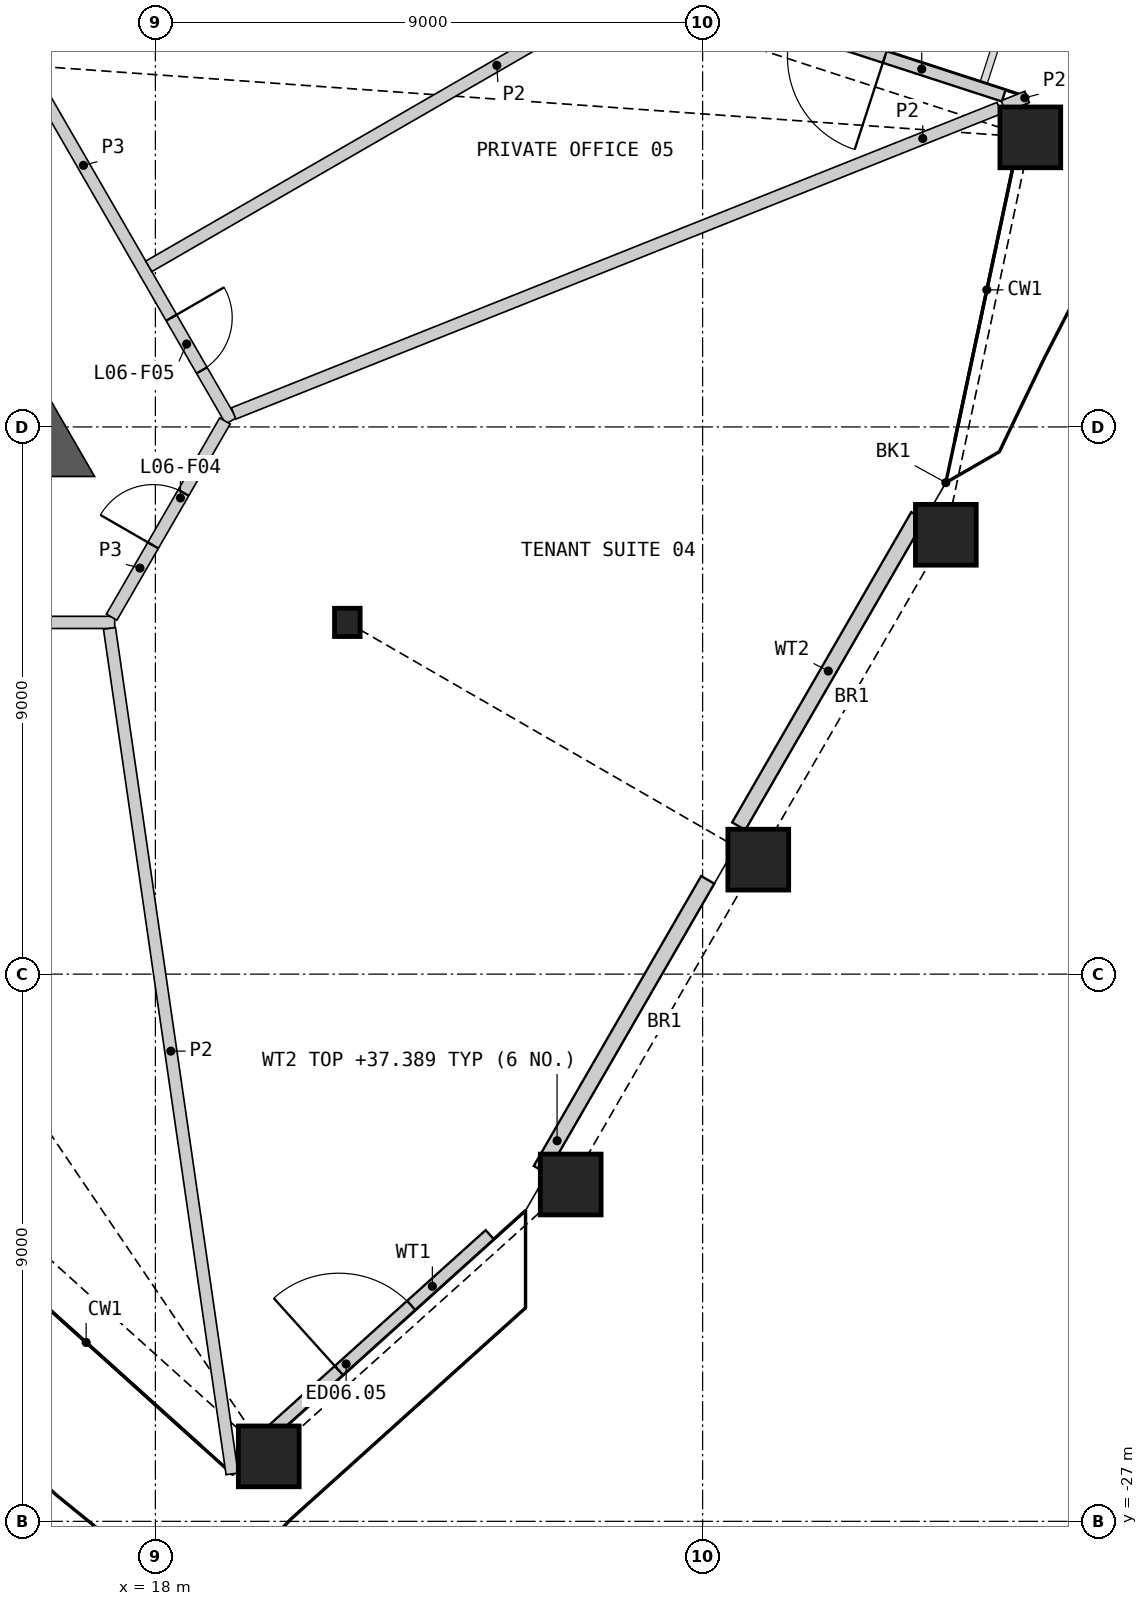
"""IFC4 building model, lengths in metres.
Left out: names, types, materials, properties, quantities, classifications, styles, units other than length and angle.
Written with IfcOpenShell. Run it as: python <this file> out.ifc"""

import sys

from ifc_helpers import new_model, si_unit, direction, frame, frame_2d, origin, origin_2d, place, context, subcontext, project, spatial, polyline, rectangle, hollow_rectangle, i_section, outline, extrude, element, fill, save


model = new_model("IFC4")
c1 = context("Model", 3, precision=1e-05, world=origin(), true_north=direction((0.0, 1.0)))
c2 = subcontext(c1, "Body", "Model", "MODEL_VIEW")
j1 = project(units=[si_unit("LENGTHUNIT", "METRE"), si_unit("PLANEANGLEUNIT", "RADIAN")], contexts=[c1])
p1 = place(None, origin())
s1 = spatial("IfcSite", under=j1, at=p1, CompositionType="ELEMENT")
p2 = place(p1, origin())
s2 = spatial("IfcBuilding", under=s1, at=p2, CompositionType="ELEMENT")
p3 = place(p2, frame((0.0, 0.0, 34.2)))
s3 = spatial("IfcBuildingStorey", under=s2, at=p3, CompositionType="ELEMENT", Elevation=34.2)
for number, where, z_axis, x_axis in (
    (1, (19.864, -25.931, 0.0), (0.0, 0.0, 1.0), (1.0, 0.0, 0.0)),
    (2, (24.83, -21.46, 0.0), (0.0, 0.0, 1.0), (1.0, 0.0, 0.0)),
    (3, (27.915, -16.117, 0.0), (0.0, 0.0, 1.0), (1.0, 0.0, 0.0)),
    (4, (31.0, -10.774, 0.0), (0.0, 0.0, 1.0), (1.0, 0.0, 0.0)),
    (5, (32.389, -4.237, 0.0), (0.0, 0.0, 1.0), (1.0, 0.0, 0.0)),
):
    element("IfcColumn", number, at=place(p3, frame(where, z_axis=z_axis, x_axis=x_axis)), inside=s3, PredefinedType="COLUMN", context=c2, shape_type="SweptSolid", body=[
        extrude(hollow_rectangle(XDim=1.0, YDim=1.0, WallThickness=0.07, at=origin_2d()), origin(), (0.0, 0.0, 1.0), 4.2),
    ])
p4 = place(p3, frame((21.157, -12.215, 0.0), z_axis=(0.0, 0.0, 1.0), x_axis=(1.0, 0.0, 0.0)))
e6 = element("IfcColumn", 6, at=p4, inside=s3, PredefinedType="COLUMN", context=c2, shape_type="SweptSolid", body=[
    extrude(i_section(OverallWidth=0.421, OverallDepth=0.465, WebThickness=0.045, FlangeThickness=0.072, at=origin_2d()), origin(), (0.0, 0.0, 1.0), 4.2),
])
p5 = place(p3, frame((19.726, -25.682, 0.0), z_axis=(0.0, 0.0, 1.0), x_axis=(0.74314347906, 0.669132101704, 0.0)))
e7 = element("IfcWall", 7, at=p5, inside=s3, PredefinedType="SOLIDWALL", context=c2, shape_type="SweptSolid", body=[
    extrude(rectangle(XDim=5.077, YDim=0.2, at=frame_2d((2.538, 0.0))), origin(), (0.0, 0.0, 1.0), 3.189),
])
p6 = place(p5, frame((1.738, 0.0, 0.0)))
e8 = element("IfcOpeningElement", 8, at=p6, cuts=e7, PredefinedType="OPENING", context=c2, shape_type="SweptSolid", body=[
    extrude(rectangle(XDim=1.6, YDim=2.4, at=frame_2d((0.8, 1.2))), frame((0.0, 0.11, 0.0), z_axis=(0.0, -1.0, 0.0), x_axis=(1.0, 0.0, 0.0)), (0.0, 0.0, 1.0), 0.22),
])
p7 = place(p3, frame((24.331, -21.217, 0.0), z_axis=(0.0, 0.0, 1.0), x_axis=(0.500006469283, 0.86602166871, 0.0)))
e9 = element("IfcWall", 9, at=p7, inside=s3, PredefinedType="SOLIDWALL", context=c2, shape_type="SweptSolid", body=[
    extrude(rectangle(XDim=5.506, YDim=0.25, at=frame_2d((2.753, 0.0))), origin(), (0.0, 0.0, 1.0), 3.189),
])
p8 = place(p3, frame((27.593, -15.567, 0.0), z_axis=(0.0, 0.0, 1.0), x_axis=(0.500010498135, 0.866019342599, 0.0)))
e10 = element("IfcWall", 10, at=p8, inside=s3, PredefinedType="SOLIDWALL", context=c2, shape_type="SweptSolid", body=[
    extrude(rectangle(XDim=5.894, YDim=0.25, at=frame_2d((2.947, 0.0))), origin(), (0.0, 0.0, 1.0), 3.189),
])
p9 = place(p3, frame((31.952, -3.552, 0.0), z_axis=(0.0, 0.0, 1.0), x_axis=(-0.951049886998, 0.309037396509, 0.0)))
e11 = element("IfcWall", 11, at=p9, inside=s3, PredefinedType="SOLIDWALL", context=c2, shape_type="SweptSolid", body=[
    extrude(rectangle(XDim=5.671, YDim=0.2, at=frame_2d((2.835, 0.0))), origin(), (0.0, 0.0, 1.0), 3.189),
])
p10 = place(p9, frame((2.057, 0.0, 0.0)))
e12 = element("IfcOpeningElement", 12, at=p10, cuts=e11, PredefinedType="OPENING", context=c2, shape_type="SweptSolid", body=[
    extrude(rectangle(XDim=1.6, YDim=2.4, at=frame_2d((0.8, 1.2))), frame((0.0, 0.11, 0.0), z_axis=(0.0, -1.0, 0.0), x_axis=(1.0, 0.0, 0.0)), (0.0, 0.0, 1.0), 0.22),
])
p11 = place(p3, origin())
e13 = element("IfcWall", 13, at=p11, inside=s3, PredefinedType="SHEAR", context=c2, shape_type="SweptSolid", body=[
    extrude(outline(polyline([(15.441, -9.815), (15.441, -8.915), (16.221, -8.465), (17.0, -9.815), (15.441, -9.815)])), origin(), (0.0, 0.0, 1.0), 3.8),
])
p12 = place(p3, frame((10.821, -12.215, 0.0), z_axis=(0.0, 0.0, 1.0), x_axis=(1.0, 0.0, 0.0)))
e14 = element("IfcWall", 14, at=p12, inside=s3, PredefinedType="PARTITIONING", context=c2, shape_type="SweptSolid", body=[
    extrude(rectangle(XDim=6.51, YDim=0.2, at=frame_2d((3.255, 0.0))), origin(), (0.0, 0.0, 1.0), 3.8),
])
p13 = place(p12, frame((2.655, 0.0, 0.0)))
e15 = element("IfcOpeningElement", 15, at=p13, cuts=e14, PredefinedType="OPENING", context=c2, shape_type="SweptSolid", body=[
    extrude(rectangle(XDim=1.0, YDim=2.1, at=frame_2d((0.5, 1.05))), frame((0.0, 0.11, 0.0), z_axis=(0.0, -1.0, 0.0), x_axis=(1.0, 0.0, 0.0)), (0.0, 0.0, 1.0), 0.22),
])
p14 = place(p3, frame((16.008, -3.296, 0.0), z_axis=(0.0, 0.0, 1.0), x_axis=(0.499984737558, -0.86603421538, 0.0)))
e16 = element("IfcWall", 16, at=p14, inside=s3, PredefinedType="PARTITIONING", context=c2, shape_type="SweptSolid", body=[
    extrude(rectangle(XDim=6.473, YDim=0.2, at=frame_2d((3.236, 0.0))), origin(), (0.0, 0.0, 1.0), 3.8),
])
p15 = place(p14, frame((4.512, 0.0, 0.0)))
e17 = element("IfcOpeningElement", 17, at=p15, cuts=e16, PredefinedType="OPENING", context=c2, shape_type="SweptSolid", body=[
    extrude(rectangle(XDim=1.0, YDim=2.1, at=frame_2d((0.5, 1.05))), frame((0.0, 0.11, 0.0), z_axis=(0.0, -1.0, 0.0), x_axis=(1.0, 0.0, 0.0)), (0.0, 0.0, 1.0), 0.22),
])
p16 = place(p3, frame((17.281, -12.128, 0.0), z_axis=(0.0, 0.0, 1.0), x_axis=(0.499958791762, 0.866049194065, 0.0)))
e18 = element("IfcWall", 18, at=p16, inside=s3, PredefinedType="PARTITIONING", context=c2, shape_type="SweptSolid", body=[
    extrude(rectangle(XDim=3.726, YDim=0.2, at=frame_2d((1.863, 0.0))), origin(), (0.0, 0.0, 1.0), 3.8),
])
p17 = place(p16, frame((1.363, 0.0, 0.0)))
e19 = element("IfcOpeningElement", 19, at=p17, cuts=e18, PredefinedType="OPENING", context=c2, shape_type="SweptSolid", body=[
    extrude(rectangle(XDim=1.0, YDim=2.1, at=frame_2d((0.5, 1.05))), frame((0.0, 0.11, 0.0), z_axis=(0.0, -1.0, 0.0), x_axis=(1.0, 0.0, 0.0)), (0.0, 0.0, 1.0), 0.22),
])
p18 = place(p3, frame((17.245, -12.314, 0.0), z_axis=(0.0, 0.0, 1.0), x_axis=(0.143525263071, -0.989646653539, 0.0)))
e20 = element("IfcWall", 20, at=p18, inside=s3, PredefinedType="PARTITIONING", context=c2, shape_type="SweptSolid", body=[
    extrude(rectangle(XDim=14.051, YDim=0.2, at=frame_2d((7.025, 0.0))), origin(), (0.0, 0.0, 1.0), 2.885),
])
p19 = place(p3, frame((19.287, -8.778, 0.0), z_axis=(0.0, 0.0, 1.0), x_axis=(0.928821541656, 0.370527385973, 0.0)))
e21 = element("IfcWall", 21, at=p19, inside=s3, PredefinedType="PARTITIONING", context=c2, shape_type="SweptSolid", body=[
    extrude(rectangle(XDim=13.558, YDim=0.2, at=frame_2d((6.779, 0.0))), origin(), (0.0, 0.0, 1.0), 2.885),
])
p20 = place(p3, frame((17.891, -6.359, 0.0), z_axis=(0.0, 0.0, 1.0), x_axis=(0.866021822855, 0.500006202301, 0.0)))
e22 = element("IfcWall", 22, at=p20, inside=s3, PredefinedType="PARTITIONING", context=c2, shape_type="SweptSolid", body=[
    extrude(rectangle(XDim=8.813, YDim=0.2, at=frame_2d((4.407, 0.0))), origin(), (0.0, 0.0, 1.0), 2.885),
])
p21 = place(p3, frame((31.948, -3.727, 0.0), z_axis=(0.0, 0.0, 1.0), x_axis=(0.928757356094, 0.370688243003, 0.0)))
e23 = element("IfcWall", 23, at=p21, inside=s3, PredefinedType="PARTITIONING", context=c2, shape_type="SweptSolid", body=[
    extrude(rectangle(XDim=0.419, YDim=0.2, at=frame_2d((0.21, 0.0))), origin(), (0.0, 0.0, 1.0), 2.885),
])
p22 = place(p6, origin())
e24 = element("IfcDoor", 24, at=p22, inside=s3, OperationType="DOUBLE_DOOR_SINGLE_SWING", PredefinedType="DOOR", context=c2, shape_type="SweptSolid", body=[
    extrude(rectangle(XDim=1.6, YDim=2.4, at=frame_2d((0.8, 1.2))), frame((0.0, 0.025, 0.0), z_axis=(0.0, -1.0, 0.0), x_axis=(1.0, 0.0, 0.0)), (0.0, 0.0, 1.0), 0.05),
])
fill(e8, e24)
p23 = place(p10, origin())
e25 = element("IfcDoor", 25, at=p23, inside=s3, OperationType="DOUBLE_DOOR_SINGLE_SWING", PredefinedType="DOOR", context=c2, shape_type="SweptSolid", body=[
    extrude(rectangle(XDim=1.6, YDim=2.4, at=frame_2d((0.8, 1.2))), frame((0.0, 0.025, 0.0), z_axis=(0.0, -1.0, 0.0), x_axis=(1.0, 0.0, 0.0)), (0.0, 0.0, 1.0), 0.05),
])
fill(e12, e25)
p24 = place(p17, origin())
e26 = element("IfcDoor", 26, at=p24, inside=s3, OperationType="SINGLE_SWING_LEFT", PredefinedType="DOOR", context=c2, shape_type="SweptSolid", body=[
    extrude(rectangle(XDim=1.0, YDim=2.1, at=frame_2d((0.5, 1.05))), frame((0.0, 0.025, 0.0), z_axis=(0.0, -1.0, 0.0), x_axis=(1.0, 0.0, 0.0)), (0.0, 0.0, 1.0), 0.05),
])
fill(e19, e26)
p25 = place(p15, origin())
e27 = element("IfcDoor", 27, at=p25, inside=s3, OperationType="SINGLE_SWING_LEFT", PredefinedType="DOOR", context=c2, shape_type="SweptSolid", body=[
    extrude(rectangle(XDim=1.0, YDim=2.1, at=frame_2d((0.5, 1.05))), frame((0.0, 0.025, 0.0), z_axis=(0.0, -1.0, 0.0), x_axis=(1.0, 0.0, 0.0)), (0.0, 0.0, 1.0), 0.05),
])
fill(e17, e27)
save(model, sys.argv[1])
